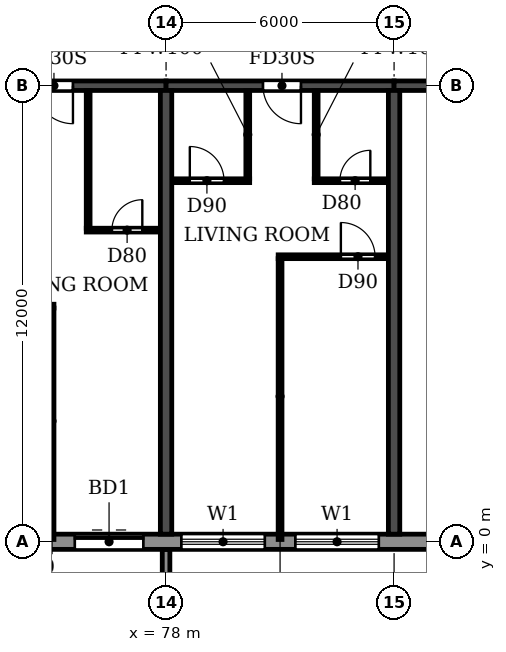
"""IFC4 building model, lengths in metres.
Left out: names, types, materials, properties, quantities, classifications, styles, units other than length and angle.
Written with IfcOpenShell. Run it as: python <this file> out.ifc"""

import sys

from ifc_helpers import new_model, si_unit, direction, frame, frame_2d, origin, place, context, subcontext, project, spatial, polyline, rectangle, outline, extrude, source, transform, mapped, element, fill, save


model = new_model("IFC4")
c1 = context("Model", 3, precision=1e-05, world=origin(), true_north=direction((0.0, 1.0)))
c2 = subcontext(c1, "Body", "Model", "MODEL_VIEW")
j1 = project(units=[si_unit("LENGTHUNIT", "METRE"), si_unit("PLANEANGLEUNIT", "RADIAN")], contexts=[c1])
p1 = place(None, origin())
s1 = spatial("IfcSite", under=j1, at=p1, CompositionType="ELEMENT")
p2 = place(p1, origin())
s2 = spatial("IfcBuilding", under=s1, at=p2, CompositionType="ELEMENT")
p3 = place(p2, frame((0.0, 0.0, 125.7)))
s3 = spatial("IfcBuildingStorey", under=s2, at=p3, CompositionType="ELEMENT", Elevation=125.7)
for number, where, z_axis, x_axis in (
    (1, (78.0, 0.2, 0.0), (0.0, 0.0, 1.0), (0.0, 1.0, 0.0)),
    (2, (84.0, 0.2, 0.0), (0.0, 0.0, 1.0), (0.0, 1.0, 0.0)),
):
    element("IfcWall", number, at=place(p3, frame(where, z_axis=z_axis, x_axis=x_axis)), inside=s3, PredefinedType="SHEAR", context=c2, shape_type="SweptSolid", body=[
        extrude(rectangle(XDim=11.675, YDim=0.3, at=frame_2d((5.837, 0.0))), origin(), (0.0, 0.0, 1.0), 3.07),
    ])
p4 = place(p3, frame((72.0, 12.0, 0.0), z_axis=(0.0, 0.0, 1.0), x_axis=(1.0, 0.0, 0.0)))
e3 = element("IfcWall", 3, at=p4, inside=s3, PredefinedType="SHEAR", context=c2, shape_type="SweptSolid", body=[
    extrude(rectangle(XDim=6.0, YDim=0.25, at=frame_2d((3.0, 0.0))), origin(), (0.0, 0.0, 1.0), 2.47),
])
p5 = place(p4, frame((2.55, 0.0, 0.0)))
e4 = element("IfcOpeningElement", 4, at=p5, cuts=e3, PredefinedType="OPENING", context=c2, shape_type="SweptSolid", body=[
    extrude(rectangle(XDim=1.0, YDim=2.1, at=frame_2d((0.5, 1.05))), frame((0.0, 0.135, 0.0), z_axis=(0.0, -1.0, 0.0), x_axis=(1.0, 0.0, 0.0)), (0.0, 0.0, 1.0), 0.27),
])
p6 = place(p3, frame((78.0, 12.0, 0.0), z_axis=(0.0, 0.0, 1.0), x_axis=(1.0, 0.0, 0.0)))
e5 = element("IfcWall", 5, at=p6, inside=s3, PredefinedType="SHEAR", context=c2, shape_type="SweptSolid", body=[
    extrude(rectangle(XDim=6.0, YDim=0.25, at=frame_2d((3.0, 0.0))), origin(), (0.0, 0.0, 1.0), 2.47),
])
p7 = place(p6, frame((2.55, 0.0, 0.0)))
e6 = element("IfcOpeningElement", 6, at=p7, cuts=e5, PredefinedType="OPENING", context=c2, shape_type="SweptSolid", body=[
    extrude(rectangle(XDim=1.0, YDim=2.1, at=frame_2d((0.5, 1.05))), frame((0.0, 0.135, 0.0), z_axis=(0.0, -1.0, 0.0), x_axis=(1.0, 0.0, 0.0)), (0.0, 0.0, 1.0), 0.27),
])
p8 = place(p3, frame((84.0, 12.0, 0.0), z_axis=(0.0, 0.0, 1.0), x_axis=(1.0, 0.0, 0.0)))
e7 = element("IfcWall", 7, at=p8, inside=s3, PredefinedType="SHEAR", context=c2, shape_type="SweptSolid", body=[
    extrude(rectangle(XDim=5.8, YDim=0.25, at=frame_2d((2.9, 0.0))), origin(), (0.0, 0.0, 1.0), 2.47),
])
p9 = place(p8, frame((2.5, 0.0, 0.0)))
e8 = element("IfcOpeningElement", 8, at=p9, cuts=e7, PredefinedType="OPENING", context=c2, shape_type="SweptSolid", body=[
    extrude(rectangle(XDim=1.0, YDim=2.1, at=frame_2d((0.5, 1.05))), frame((0.0, 0.135, 0.0), z_axis=(0.0, -1.0, 0.0), x_axis=(1.0, 0.0, 0.0)), (0.0, 0.0, 1.0), 0.27),
])
p10 = place(p3, frame((16.683, 0.0, 0.0), z_axis=(0.0, 0.0, 1.0), x_axis=(1.0, 0.0, 0.0)))
e9 = element("IfcWall", 9, at=p10, inside=s3, PredefinedType="STANDARD", context=c2, shape_type="SweptSolid", body=[
    extrude(rectangle(XDim=68.634, YDim=0.4, at=frame_2d((34.317, 0.0))), origin(), (0.0, 0.0, 1.0), 3.07),
])
p11 = place(p10, frame((1.717, 0.0, 0.9)))
e10 = element("IfcOpeningElement", 10, at=p11, cuts=e9, PredefinedType="OPENING", context=c2, shape_type="SweptSolid", body=[
    extrude(rectangle(XDim=2.2, YDim=1.5, at=frame_2d((1.1, 0.75))), frame((0.0, 0.21, 0.0), z_axis=(0.0, -1.0, 0.0), x_axis=(1.0, 0.0, 0.0)), (0.0, 0.0, 1.0), 0.42),
])
p12 = place(p10, frame((4.717, 0.0, 0.9)))
e11 = element("IfcOpeningElement", 11, at=p12, cuts=e9, PredefinedType="OPENING", context=c2, shape_type="SweptSolid", body=[
    extrude(rectangle(XDim=2.2, YDim=1.5, at=frame_2d((1.1, 0.75))), frame((0.0, 0.21, 0.0), z_axis=(0.0, -1.0, 0.0), x_axis=(1.0, 0.0, 0.0)), (0.0, 0.0, 1.0), 0.42),
])
p13 = place(p10, frame((7.717, 0.0, 0.9)))
e12 = element("IfcOpeningElement", 12, at=p13, cuts=e9, PredefinedType="OPENING", context=c2, shape_type="SweptSolid", body=[
    extrude(rectangle(XDim=2.2, YDim=1.5, at=frame_2d((1.1, 0.75))), frame((0.0, 0.21, 0.0), z_axis=(0.0, -1.0, 0.0), x_axis=(1.0, 0.0, 0.0)), (0.0, 0.0, 1.0), 0.42),
])
p14 = place(p10, frame((10.717, 0.0, 0.9)))
e13 = element("IfcOpeningElement", 13, at=p14, cuts=e9, PredefinedType="OPENING", context=c2, shape_type="SweptSolid", body=[
    extrude(rectangle(XDim=2.2, YDim=1.5, at=frame_2d((1.1, 0.75))), frame((0.0, 0.21, 0.0), z_axis=(0.0, -1.0, 0.0), x_axis=(1.0, 0.0, 0.0)), (0.0, 0.0, 1.0), 0.42),
])
p15 = place(p10, frame((13.717, 0.0, 0.9)))
e14 = element("IfcOpeningElement", 14, at=p15, cuts=e9, PredefinedType="OPENING", context=c2, shape_type="SweptSolid", body=[
    extrude(rectangle(XDim=2.2, YDim=1.5, at=frame_2d((1.1, 0.75))), frame((0.0, 0.21, 0.0), z_axis=(0.0, -1.0, 0.0), x_axis=(1.0, 0.0, 0.0)), (0.0, 0.0, 1.0), 0.42),
])
p16 = place(p10, frame((16.717, 0.0, 0.9)))
e15 = element("IfcOpeningElement", 15, at=p16, cuts=e9, PredefinedType="OPENING", context=c2, shape_type="SweptSolid", body=[
    extrude(rectangle(XDim=2.2, YDim=1.5, at=frame_2d((1.1, 0.75))), frame((0.0, 0.21, 0.0), z_axis=(0.0, -1.0, 0.0), x_axis=(1.0, 0.0, 0.0)), (0.0, 0.0, 1.0), 0.42),
])
p17 = place(p10, frame((19.717, 0.0, 0.9)))
e16 = element("IfcOpeningElement", 16, at=p17, cuts=e9, PredefinedType="OPENING", context=c2, shape_type="SweptSolid", body=[
    extrude(rectangle(XDim=2.2, YDim=1.5, at=frame_2d((1.1, 0.75))), frame((0.0, 0.21, 0.0), z_axis=(0.0, -1.0, 0.0), x_axis=(1.0, 0.0, 0.0)), (0.0, 0.0, 1.0), 0.42),
])
p18 = place(p10, frame((22.917, 0.0, 0.0)))
e17 = element("IfcOpeningElement", 17, at=p18, cuts=e9, PredefinedType="OPENING", context=c2, shape_type="SweptSolid", body=[
    extrude(rectangle(XDim=1.8, YDim=2.4, at=frame_2d((0.9, 1.2))), frame((0.0, 0.21, 0.0), z_axis=(0.0, -1.0, 0.0), x_axis=(1.0, 0.0, 0.0)), (0.0, 0.0, 1.0), 0.42),
])
p19 = place(p10, frame((25.717, 0.0, 0.9)))
e18 = element("IfcOpeningElement", 18, at=p19, cuts=e9, PredefinedType="OPENING", context=c2, shape_type="SweptSolid", body=[
    extrude(rectangle(XDim=2.2, YDim=1.5, at=frame_2d((1.1, 0.75))), frame((0.0, 0.21, 0.0), z_axis=(0.0, -1.0, 0.0), x_axis=(1.0, 0.0, 0.0)), (0.0, 0.0, 1.0), 0.42),
])
p20 = place(p10, frame((28.717, 0.0, 0.9)))
e19 = element("IfcOpeningElement", 19, at=p20, cuts=e9, PredefinedType="OPENING", context=c2, shape_type="SweptSolid", body=[
    extrude(rectangle(XDim=2.2, YDim=1.5, at=frame_2d((1.1, 0.75))), frame((0.0, 0.21, 0.0), z_axis=(0.0, -1.0, 0.0), x_axis=(1.0, 0.0, 0.0)), (0.0, 0.0, 1.0), 0.42),
])
p21 = place(p10, frame((31.717, 0.0, 0.9)))
e20 = element("IfcOpeningElement", 20, at=p21, cuts=e9, PredefinedType="OPENING", context=c2, shape_type="SweptSolid", body=[
    extrude(rectangle(XDim=2.2, YDim=1.5, at=frame_2d((1.1, 0.75))), frame((0.0, 0.21, 0.0), z_axis=(0.0, -1.0, 0.0), x_axis=(1.0, 0.0, 0.0)), (0.0, 0.0, 1.0), 0.42),
])
p22 = place(p10, frame((34.917, 0.0, 0.0)))
e21 = element("IfcOpeningElement", 21, at=p22, cuts=e9, PredefinedType="OPENING", context=c2, shape_type="SweptSolid", body=[
    extrude(rectangle(XDim=1.8, YDim=2.4, at=frame_2d((0.9, 1.2))), frame((0.0, 0.21, 0.0), z_axis=(0.0, -1.0, 0.0), x_axis=(1.0, 0.0, 0.0)), (0.0, 0.0, 1.0), 0.42),
])
p23 = place(p10, frame((37.717, 0.0, 0.9)))
e22 = element("IfcOpeningElement", 22, at=p23, cuts=e9, PredefinedType="OPENING", context=c2, shape_type="SweptSolid", body=[
    extrude(rectangle(XDim=2.2, YDim=1.5, at=frame_2d((1.1, 0.75))), frame((0.0, 0.21, 0.0), z_axis=(0.0, -1.0, 0.0), x_axis=(1.0, 0.0, 0.0)), (0.0, 0.0, 1.0), 0.42),
])
p24 = place(p10, frame((40.717, 0.0, 0.9)))
e23 = element("IfcOpeningElement", 23, at=p24, cuts=e9, PredefinedType="OPENING", context=c2, shape_type="SweptSolid", body=[
    extrude(rectangle(XDim=2.2, YDim=1.5, at=frame_2d((1.1, 0.75))), frame((0.0, 0.21, 0.0), z_axis=(0.0, -1.0, 0.0), x_axis=(1.0, 0.0, 0.0)), (0.0, 0.0, 1.0), 0.42),
])
p25 = place(p10, frame((43.717, 0.0, 0.9)))
e24 = element("IfcOpeningElement", 24, at=p25, cuts=e9, PredefinedType="OPENING", context=c2, shape_type="SweptSolid", body=[
    extrude(rectangle(XDim=2.2, YDim=1.5, at=frame_2d((1.1, 0.75))), frame((0.0, 0.21, 0.0), z_axis=(0.0, -1.0, 0.0), x_axis=(1.0, 0.0, 0.0)), (0.0, 0.0, 1.0), 0.42),
])
p26 = place(p10, frame((46.917, 0.0, 0.0)))
e25 = element("IfcOpeningElement", 25, at=p26, cuts=e9, PredefinedType="OPENING", context=c2, shape_type="SweptSolid", body=[
    extrude(rectangle(XDim=1.8, YDim=2.4, at=frame_2d((0.9, 1.2))), frame((0.0, 0.21, 0.0), z_axis=(0.0, -1.0, 0.0), x_axis=(1.0, 0.0, 0.0)), (0.0, 0.0, 1.0), 0.42),
])
p27 = place(p10, frame((49.717, 0.0, 0.9)))
e26 = element("IfcOpeningElement", 26, at=p27, cuts=e9, PredefinedType="OPENING", context=c2, shape_type="SweptSolid", body=[
    extrude(rectangle(XDim=2.2, YDim=1.5, at=frame_2d((1.1, 0.75))), frame((0.0, 0.21, 0.0), z_axis=(0.0, -1.0, 0.0), x_axis=(1.0, 0.0, 0.0)), (0.0, 0.0, 1.0), 0.42),
])
p28 = place(p10, frame((52.717, 0.0, 0.9)))
e27 = element("IfcOpeningElement", 27, at=p28, cuts=e9, PredefinedType="OPENING", context=c2, shape_type="SweptSolid", body=[
    extrude(rectangle(XDim=2.2, YDim=1.5, at=frame_2d((1.1, 0.75))), frame((0.0, 0.21, 0.0), z_axis=(0.0, -1.0, 0.0), x_axis=(1.0, 0.0, 0.0)), (0.0, 0.0, 1.0), 0.42),
])
p29 = place(p10, frame((55.717, 0.0, 0.9)))
e28 = element("IfcOpeningElement", 28, at=p29, cuts=e9, PredefinedType="OPENING", context=c2, shape_type="SweptSolid", body=[
    extrude(rectangle(XDim=2.2, YDim=1.5, at=frame_2d((1.1, 0.75))), frame((0.0, 0.21, 0.0), z_axis=(0.0, -1.0, 0.0), x_axis=(1.0, 0.0, 0.0)), (0.0, 0.0, 1.0), 0.42),
])
p30 = place(p10, frame((58.917, 0.0, 0.0)))
e29 = element("IfcOpeningElement", 29, at=p30, cuts=e9, PredefinedType="OPENING", context=c2, shape_type="SweptSolid", body=[
    extrude(rectangle(XDim=1.8, YDim=2.4, at=frame_2d((0.9, 1.2))), frame((0.0, 0.21, 0.0), z_axis=(0.0, -1.0, 0.0), x_axis=(1.0, 0.0, 0.0)), (0.0, 0.0, 1.0), 0.42),
])
p31 = place(p10, frame((61.717, 0.0, 0.9)))
e30 = element("IfcOpeningElement", 30, at=p31, cuts=e9, PredefinedType="OPENING", context=c2, shape_type="SweptSolid", body=[
    extrude(rectangle(XDim=2.2, YDim=1.5, at=frame_2d((1.1, 0.75))), frame((0.0, 0.21, 0.0), z_axis=(0.0, -1.0, 0.0), x_axis=(1.0, 0.0, 0.0)), (0.0, 0.0, 1.0), 0.42),
])
p32 = place(p10, frame((64.717, 0.0, 0.9)))
e31 = element("IfcOpeningElement", 31, at=p32, cuts=e9, PredefinedType="OPENING", context=c2, shape_type="SweptSolid", body=[
    extrude(rectangle(XDim=2.2, YDim=1.5, at=frame_2d((1.1, 0.75))), frame((0.0, 0.21, 0.0), z_axis=(0.0, -1.0, 0.0), x_axis=(1.0, 0.0, 0.0)), (0.0, 0.0, 1.0), 0.42),
])
m1 = source(origin(), c2, "Body", "SweptSolid", [
    extrude(outline(polyline([(0.0, 0.0), (0.2, 0.0), (0.2, 1.65), (0.0, 1.65), (0.0, 0.0)])), origin(), (0.0, 0.0, 1.0), 3.1),
])
p33 = place(p3, frame((77.9, -1.85, 0.0)))
e32 = element("IfcWall", 32, at=p33, inside=s3, PredefinedType="STANDARD", context=c2, shape_type="MappedRepresentation", body=[
    mapped(m1, transform((0.0, 0.0, 0.0))),
])
p34 = place(p3, frame((72.16, 6.2, 0.0), z_axis=(0.0, 0.0, 1.0), x_axis=(1.0, 0.0, 0.0)))
e33 = element("IfcWall", 33, at=p34, inside=s3, PredefinedType="PARTITIONING", context=c2, shape_type="SweptSolid", body=[
    extrude(rectangle(XDim=2.89, YDim=0.1, at=frame_2d((1.445, 0.0))), origin(), (0.0, 0.0, 1.0), 3.07),
])
p35 = place(p34, frame((0.34, 0.0, 0.0)))
e34 = element("IfcOpeningElement", 34, at=p35, cuts=e33, PredefinedType="OPENING", context=c2, shape_type="SweptSolid", body=[
    extrude(rectangle(XDim=0.9, YDim=2.1, at=frame_2d((0.45, 1.05))), frame((0.0, 0.06, 0.0), z_axis=(0.0, -1.0, 0.0), x_axis=(1.0, 0.0, 0.0)), (0.0, 0.0, 1.0), 0.12),
])
p36 = place(p3, frame((80.95, 7.5, 0.0), z_axis=(0.0, 0.0, 1.0), x_axis=(1.0, 0.0, 0.0)))
e35 = element("IfcWall", 35, at=p36, inside=s3, PredefinedType="PARTITIONING", context=c2, shape_type="SweptSolid", body=[
    extrude(rectangle(XDim=2.89, YDim=0.1, at=frame_2d((1.445, 0.0))), origin(), (0.0, 0.0, 1.0), 3.07),
])
p37 = place(p36, frame((1.65, 0.0, 0.0)))
e36 = element("IfcOpeningElement", 36, at=p37, cuts=e35, PredefinedType="OPENING", context=c2, shape_type="SweptSolid", body=[
    extrude(rectangle(XDim=0.9, YDim=2.1, at=frame_2d((0.45, 1.05))), frame((0.0, 0.06, 0.0), z_axis=(0.0, -1.0, 0.0), x_axis=(1.0, 0.0, 0.0)), (0.0, 0.0, 1.0), 0.12),
])
p38 = place(p3, frame((75.9, 8.2, 0.0), z_axis=(0.0, 0.0, 1.0), x_axis=(1.0, 0.0, 0.0)))
e37 = element("IfcWall", 37, at=p38, inside=s3, PredefinedType="PARTITIONING", context=c2, shape_type="SweptSolid", body=[
    extrude(rectangle(XDim=1.94, YDim=0.1, at=frame_2d((0.97, 0.0))), origin(), (0.0, 0.0, 1.0), 3.07),
])
p39 = place(p38, frame((0.675, 0.0, 0.0)))
e38 = element("IfcOpeningElement", 38, at=p39, cuts=e37, PredefinedType="OPENING", context=c2, shape_type="SweptSolid", body=[
    extrude(rectangle(XDim=0.8, YDim=2.1, at=frame_2d((0.4, 1.05))), frame((0.0, 0.06, 0.0), z_axis=(0.0, -1.0, 0.0), x_axis=(1.0, 0.0, 0.0)), (0.0, 0.0, 1.0), 0.12),
])
p40 = place(p3, frame((78.16, 9.5, 0.0), z_axis=(0.0, 0.0, 1.0), x_axis=(1.0, 0.0, 0.0)))
e39 = element("IfcWall", 39, at=p40, inside=s3, PredefinedType="PARTITIONING", context=c2, shape_type="SweptSolid", body=[
    extrude(rectangle(XDim=2.04, YDim=0.1, at=frame_2d((1.02, 0.0))), origin(), (0.0, 0.0, 1.0), 3.07),
])
p41 = place(p40, frame((0.465, 0.0, 0.0)))
e40 = element("IfcOpeningElement", 40, at=p41, cuts=e39, PredefinedType="OPENING", context=c2, shape_type="SweptSolid", body=[
    extrude(rectangle(XDim=0.9, YDim=2.1, at=frame_2d((0.45, 1.05))), frame((0.0, 0.06, 0.0), z_axis=(0.0, -1.0, 0.0), x_axis=(1.0, 0.0, 0.0)), (0.0, 0.0, 1.0), 0.12),
])
p42 = place(p3, frame((81.9, 9.5, 0.0), z_axis=(0.0, 0.0, 1.0), x_axis=(1.0, 0.0, 0.0)))
e41 = element("IfcWall", 41, at=p42, inside=s3, PredefinedType="PARTITIONING", context=c2, shape_type="SweptSolid", body=[
    extrude(rectangle(XDim=1.94, YDim=0.1, at=frame_2d((0.97, 0.0))), origin(), (0.0, 0.0, 1.0), 3.07),
])
p43 = place(p42, frame((0.675, 0.0, 0.0)))
e42 = element("IfcOpeningElement", 42, at=p43, cuts=e41, PredefinedType="OPENING", context=c2, shape_type="SweptSolid", body=[
    extrude(rectangle(XDim=0.8, YDim=2.1, at=frame_2d((0.4, 1.05))), frame((0.0, 0.06, 0.0), z_axis=(0.0, -1.0, 0.0), x_axis=(1.0, 0.0, 0.0)), (0.0, 0.0, 1.0), 0.12),
])
p44 = place(p3, frame((75.0, 0.06, 0.0), z_axis=(0.0, 0.0, 1.0), x_axis=(0.0, 1.0, 0.0)))
e43 = element("IfcWall", 43, at=p44, inside=s3, PredefinedType="PARTITIONING", context=c2, shape_type="SweptSolid", body=[
    extrude(rectangle(XDim=6.09, YDim=0.1, at=frame_2d((3.045, 0.0))), origin(), (0.0, 0.0, 1.0), 3.07),
])
p45 = place(p3, frame((75.95, 8.25, 0.0), z_axis=(0.0, 0.0, 1.0), x_axis=(0.0, 1.0, 0.0)))
e44 = element("IfcWall", 44, at=p45, inside=s3, PredefinedType="PARTITIONING", context=c2, shape_type="SweptSolid", body=[
    extrude(rectangle(XDim=3.615, YDim=0.1, at=frame_2d((1.808, 0.0))), origin(), (0.0, 0.0, 1.0), 3.07),
])
p46 = place(p3, frame((80.15, 9.55, 0.0), z_axis=(0.0, 0.0, 1.0), x_axis=(0.0, 1.0, 0.0)))
e45 = element("IfcWall", 45, at=p46, inside=s3, PredefinedType="PARTITIONING", context=c2, shape_type="SweptSolid", body=[
    extrude(rectangle(XDim=2.315, YDim=0.1, at=frame_2d((1.157, 0.0))), origin(), (0.0, 0.0, 1.0), 3.07),
])
p47 = place(p3, frame((81.0, 0.06, 0.0), z_axis=(0.0, 0.0, 1.0), x_axis=(0.0, 1.0, 0.0)))
e46 = element("IfcWall", 46, at=p47, inside=s3, PredefinedType="PARTITIONING", context=c2, shape_type="SweptSolid", body=[
    extrude(rectangle(XDim=7.39, YDim=0.1, at=frame_2d((3.695, 0.0))), origin(), (0.0, 0.0, 1.0), 3.07),
])
p48 = place(p3, frame((81.95, 9.55, 0.0), z_axis=(0.0, 0.0, 1.0), x_axis=(0.0, 1.0, 0.0)))
e47 = element("IfcWall", 47, at=p48, inside=s3, PredefinedType="PARTITIONING", context=c2, shape_type="SweptSolid", body=[
    extrude(rectangle(XDim=2.315, YDim=0.1, at=frame_2d((1.157, 0.0))), origin(), (0.0, 0.0, 1.0), 3.07),
])
p49 = place(p30, origin())
e48 = element("IfcDoor", 48, at=p49, inside=s3, OperationType="DOUBLE_DOOR_SLIDING", PredefinedType="DOOR", context=c2, shape_type="SweptSolid", body=[
    extrude(rectangle(XDim=1.8, YDim=2.4, at=frame_2d((0.9, 1.2))), frame((0.0, 0.025, 0.0), z_axis=(0.0, -1.0, 0.0), x_axis=(1.0, 0.0, 0.0)), (0.0, 0.0, 1.0), 0.05),
])
fill(e29, e48)
p50 = place(p31, origin())
e49 = element("IfcWindow", 49, at=p50, inside=s3, PartitioningType="DOUBLE_PANEL_HORIZONTAL", PredefinedType="WINDOW", context=c2, shape_type="SweptSolid", body=[
    extrude(rectangle(XDim=2.2, YDim=1.5, at=frame_2d((1.1, 0.75))), frame((0.0, 0.03, 0.0), z_axis=(0.0, -1.0, 0.0), x_axis=(1.0, 0.0, 0.0)), (0.0, 0.0, 1.0), 0.06),
])
fill(e30, e49)
p51 = place(p32, origin())
e50 = element("IfcWindow", 50, at=p51, inside=s3, PartitioningType="DOUBLE_PANEL_HORIZONTAL", PredefinedType="WINDOW", context=c2, shape_type="SweptSolid", body=[
    extrude(rectangle(XDim=2.2, YDim=1.5, at=frame_2d((1.1, 0.75))), frame((0.0, 0.03, 0.0), z_axis=(0.0, -1.0, 0.0), x_axis=(1.0, 0.0, 0.0)), (0.0, 0.0, 1.0), 0.06),
])
fill(e31, e50)
p52 = place(p5, frame((1.0, 0.0, 0.0), z_axis=(0.0, 0.0, 1.0), x_axis=(-1.0, 0.0, 0.0)))
e51 = element("IfcDoor", 51, at=p52, inside=s3, OperationType="SINGLE_SWING_LEFT", PredefinedType="DOOR", context=c2, shape_type="SweptSolid", body=[
    extrude(rectangle(XDim=1.0, YDim=2.1, at=frame_2d((0.5, 1.05))), frame((0.0, 0.025, 0.0), z_axis=(0.0, -1.0, 0.0), x_axis=(1.0, 0.0, 0.0)), (0.0, 0.0, 1.0), 0.05),
])
fill(e4, e51)
p53 = place(p39, origin())
e52 = element("IfcDoor", 52, at=p53, inside=s3, OperationType="SINGLE_SWING_RIGHT", PredefinedType="DOOR", context=c2, shape_type="SweptSolid", body=[
    extrude(rectangle(XDim=0.8, YDim=2.1, at=frame_2d((0.4, 1.05))), frame((0.0, 0.025, 0.0), z_axis=(0.0, -1.0, 0.0), x_axis=(1.0, 0.0, 0.0)), (0.0, 0.0, 1.0), 0.05),
])
fill(e38, e52)
p54 = place(p41, origin())
e53 = element("IfcDoor", 53, at=p54, inside=s3, OperationType="SINGLE_SWING_LEFT", PredefinedType="DOOR", context=c2, shape_type="SweptSolid", body=[
    extrude(rectangle(XDim=0.9, YDim=2.1, at=frame_2d((0.45, 1.05))), frame((0.0, 0.025, 0.0), z_axis=(0.0, -1.0, 0.0), x_axis=(1.0, 0.0, 0.0)), (0.0, 0.0, 1.0), 0.05),
])
fill(e40, e53)
p55 = place(p7, frame((1.0, 0.0, 0.0), z_axis=(0.0, 0.0, 1.0), x_axis=(-1.0, 0.0, 0.0)))
e54 = element("IfcDoor", 54, at=p55, inside=s3, OperationType="SINGLE_SWING_LEFT", PredefinedType="DOOR", context=c2, shape_type="SweptSolid", body=[
    extrude(rectangle(XDim=1.0, YDim=2.1, at=frame_2d((0.5, 1.05))), frame((0.0, 0.025, 0.0), z_axis=(0.0, -1.0, 0.0), x_axis=(1.0, 0.0, 0.0)), (0.0, 0.0, 1.0), 0.05),
])
fill(e6, e54)
p56 = place(p43, origin())
e55 = element("IfcDoor", 55, at=p56, inside=s3, OperationType="SINGLE_SWING_RIGHT", PredefinedType="DOOR", context=c2, shape_type="SweptSolid", body=[
    extrude(rectangle(XDim=0.8, YDim=2.1, at=frame_2d((0.4, 1.05))), frame((0.0, 0.025, 0.0), z_axis=(0.0, -1.0, 0.0), x_axis=(1.0, 0.0, 0.0)), (0.0, 0.0, 1.0), 0.05),
])
fill(e42, e55)
p57 = place(p37, origin())
e56 = element("IfcDoor", 56, at=p57, inside=s3, OperationType="SINGLE_SWING_LEFT", PredefinedType="DOOR", context=c2, shape_type="SweptSolid", body=[
    extrude(rectangle(XDim=0.9, YDim=2.1, at=frame_2d((0.45, 1.05))), frame((0.0, 0.025, 0.0), z_axis=(0.0, -1.0, 0.0), x_axis=(1.0, 0.0, 0.0)), (0.0, 0.0, 1.0), 0.05),
])
fill(e36, e56)
save(model, sys.argv[1])
